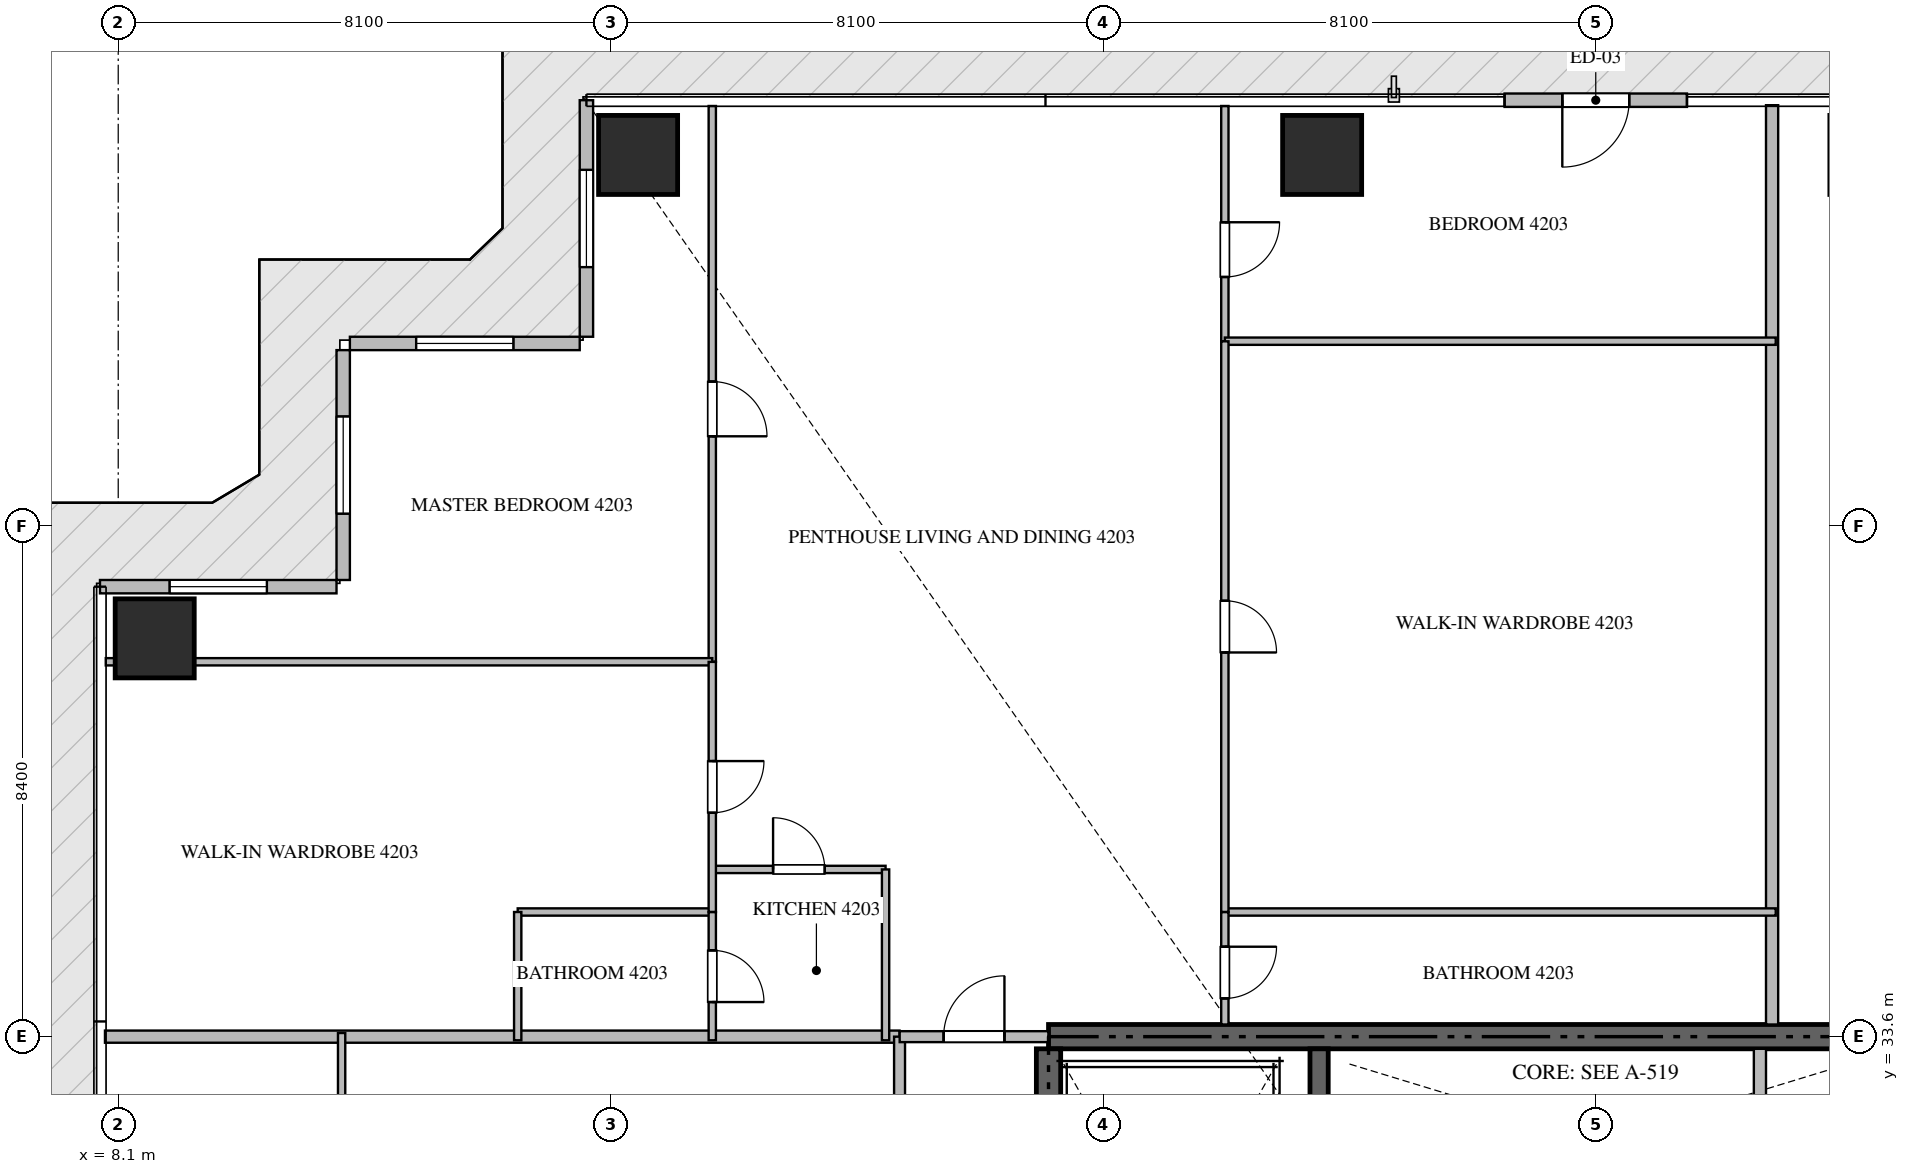
"""IFC4 building model, lengths in metres.
Left out: names, types, materials, properties, quantities, classifications, styles, units other than length and angle.
Written with IfcOpenShell. Run it as: python <this file> out.ifc"""

import sys

from ifc_helpers import new_model, si_unit, direction, frame, frame_2d, origin, origin_2d, place, context, subcontext, project, spatial, rectangle, extrude, source, transform, mapped, element, fill, save


model = new_model("IFC4")
c1 = context("Model", 3, precision=1e-05, world=origin(), true_north=direction((0.0, 1.0)))
c2 = subcontext(c1, "Body", "Model", "MODEL_VIEW")
j1 = project(units=[si_unit("LENGTHUNIT", "METRE"), si_unit("PLANEANGLEUNIT", "RADIAN")], contexts=[c1])
p1 = place(None, origin())
s1 = spatial("IfcSite", under=j1, at=p1, CompositionType="ELEMENT")
p2 = place(p1, origin())
s2 = spatial("IfcBuilding", under=s1, at=p2, CompositionType="ELEMENT")
p3 = place(p2, frame((0.0, 0.0, 168.9)))
s3 = spatial("IfcBuildingStorey", under=s2, at=p3, CompositionType="ELEMENT", Elevation=168.9)
p4 = place(p3, frame((41.4, 33.6, -0.26), z_axis=(0.0, 0.0, 1.0), x_axis=(-1.0, 0.0, 0.0)))
e1 = element("IfcWall", 1, at=p4, inside=s3, PredefinedType="SHEAR", context=c2, shape_type="SweptSolid", body=[
    extrude(rectangle(XDim=18.0, YDim=0.4, at=frame_2d((9.0, 0.0))), origin(), (0.0, 0.0, 1.0), 3.748),
])
p5 = place(p3, frame((23.4, 24.25, -0.26), z_axis=(0.0, 0.0, 1.0), x_axis=(0.0, 1.0, 0.0)))
e2 = element("IfcWall", 2, at=p5, inside=s3, PredefinedType="SHEAR", context=c2, shape_type="SweptSolid", body=[
    extrude(rectangle(XDim=9.15, YDim=0.4, at=frame_2d((4.575, 0.0))), origin(), (0.0, 0.0, 1.0), 3.748),
])
p6 = place(p3, frame((27.85, 23.55, -0.26), z_axis=(0.0, 0.0, 1.0), x_axis=(0.0, 1.0, 0.0)))
e3 = element("IfcWall", 3, at=p6, inside=s3, PredefinedType="SHEAR", context=c2, shape_type="SweptSolid", body=[
    extrude(rectangle(XDim=9.85, YDim=0.3, at=frame_2d((4.925, 0.0))), origin(), (0.0, 0.0, 1.0), 3.748),
])
m1 = source(origin(), c2, "Body", "SweptSolid", [
    extrude(rectangle(XDim=1.3, YDim=1.3, at=origin_2d()), origin(), (0.0, 0.0, 1.0), 3.75),
])
for number, where, z_axis, x_axis in (
    (4, (16.65, 48.1, -0.26), (0.0, 0.0, 1.0), (1.0, 0.0, 0.0)),
    (5, (27.9, 48.1, -0.26), (0.0, 0.0, 1.0), (1.0, 0.0, 0.0)),
    (6, (8.7, 40.15, -0.26), (0.0, 0.0, 1.0), (1.0, 0.0, 0.0)),
):
    element("IfcColumn", number, at=place(p3, frame(where, z_axis=z_axis, x_axis=x_axis)), inside=s3, PredefinedType="COLUMN", context=c2, shape_type="MappedRepresentation", body=[
        mapped(m1, transform((0.0, 0.0, 0.0), scale=1.0)),
    ])
p7 = place(p3, frame((33.9, 49.0, 0.0), z_axis=(0.0, 0.0, 1.0), x_axis=(-1.0, 0.0, 0.0)))
e7 = element("IfcWall", 7, at=p7, inside=s3, PredefinedType="ELEMENTEDWALL", context=c2, shape_type="SweptSolid", body=[
    extrude(rectangle(XDim=3.0, YDim=0.22, at=frame_2d((1.5, 0.0))), origin(), (0.0, 0.0, 1.0), 3.475),
])
p8 = place(p7, frame((0.95, 0.0, 0.0)))
e8 = element("IfcOpeningElement", 8, at=p8, cuts=e7, PredefinedType="OPENING", context=c2, shape_type="SweptSolid", body=[
    extrude(rectangle(XDim=1.1, YDim=2.2, at=frame_2d((0.55, 1.1))), frame((0.0, 0.12, 0.0), z_axis=(0.0, -1.0, 0.0), x_axis=(1.0, 0.0, 0.0)), (0.0, 0.0, 1.0), 0.24),
])
p9 = place(p3, frame((15.8, 49.0, 0.0), z_axis=(0.0, 0.0, 1.0), x_axis=(0.0, -1.0, 0.0)))
e9 = element("IfcWall", 9, at=p9, inside=s3, PredefinedType="ELEMENTEDWALL", context=c2, shape_type="SweptSolid", body=[
    extrude(rectangle(XDim=3.89, YDim=0.22, at=frame_2d((1.945, 0.0))), origin(), (0.0, 0.0, 1.0), 3.475),
])
p10 = place(p9, frame((1.145, 0.0, 0.65)))
e10 = element("IfcOpeningElement", 10, at=p10, cuts=e9, PredefinedType="OPENING", context=c2, shape_type="SweptSolid", body=[
    extrude(rectangle(XDim=1.6, YDim=2.1, at=frame_2d((0.8, 1.05))), frame((0.0, 0.12, 0.0), z_axis=(0.0, -1.0, 0.0), x_axis=(1.0, 0.0, 0.0)), (0.0, 0.0, 1.0), 0.24),
])
p11 = place(p3, frame((15.69, 45.0, 0.0), z_axis=(0.0, 0.0, 1.0), x_axis=(-1.0, 0.0, 0.0)))
e11 = element("IfcWall", 11, at=p11, inside=s3, PredefinedType="ELEMENTEDWALL", context=c2, shape_type="SweptSolid", body=[
    extrude(rectangle(XDim=3.78, YDim=0.22, at=frame_2d((1.89, 0.0))), origin(), (0.0, 0.0, 1.0), 3.475),
])
p12 = place(p11, frame((1.09, 0.0, 0.65)))
e12 = element("IfcOpeningElement", 12, at=p12, cuts=e11, PredefinedType="OPENING", context=c2, shape_type="SweptSolid", body=[
    extrude(rectangle(XDim=1.6, YDim=2.1, at=frame_2d((0.8, 1.05))), frame((0.0, 0.12, 0.0), z_axis=(0.0, -1.0, 0.0), x_axis=(1.0, 0.0, 0.0)), (0.0, 0.0, 1.0), 0.24),
])
p13 = place(p3, frame((11.8, 44.89, 0.0), z_axis=(0.0, 0.0, 1.0), x_axis=(0.0, -1.0, 0.0)))
e13 = element("IfcWall", 13, at=p13, inside=s3, PredefinedType="ELEMENTEDWALL", context=c2, shape_type="SweptSolid", body=[
    extrude(rectangle(XDim=3.78, YDim=0.22, at=frame_2d((1.89, 0.0))), origin(), (0.0, 0.0, 1.0), 3.475),
])
p14 = place(p13, frame((1.09, 0.0, 0.65)))
e14 = element("IfcOpeningElement", 14, at=p14, cuts=e13, PredefinedType="OPENING", context=c2, shape_type="SweptSolid", body=[
    extrude(rectangle(XDim=1.6, YDim=2.1, at=frame_2d((0.8, 1.05))), frame((0.0, 0.12, 0.0), z_axis=(0.0, -1.0, 0.0), x_axis=(1.0, 0.0, 0.0)), (0.0, 0.0, 1.0), 0.24),
])
p15 = place(p3, frame((11.69, 41.0, 0.0), z_axis=(0.0, 0.0, 1.0), x_axis=(-1.0, 0.0, 0.0)))
e15 = element("IfcWall", 15, at=p15, inside=s3, PredefinedType="ELEMENTEDWALL", context=c2, shape_type="SweptSolid", body=[
    extrude(rectangle(XDim=3.89, YDim=0.22, at=frame_2d((1.945, 0.0))), origin(), (0.0, 0.0, 1.0), 3.475),
])
p16 = place(p15, frame((1.145, 0.0, 0.65)))
e16 = element("IfcOpeningElement", 16, at=p16, cuts=e15, PredefinedType="OPENING", context=c2, shape_type="SweptSolid", body=[
    extrude(rectangle(XDim=1.6, YDim=2.1, at=frame_2d((0.8, 1.05))), frame((0.0, 0.12, 0.0), z_axis=(0.0, -1.0, 0.0), x_axis=(1.0, 0.0, 0.0)), (0.0, 0.0, 1.0), 0.24),
])
p17 = place(p3, frame((35.1, 30.75, 0.0), z_axis=(0.0, 0.0, 1.0), x_axis=(0.0, 1.0, 0.0)))
e17 = element("IfcWall", 17, at=p17, inside=s3, PredefinedType="STANDARD", context=c2, shape_type="SweptSolid", body=[
    extrude(rectangle(XDim=2.65, YDim=0.2, at=frame_2d((1.325, 0.0))), origin(), (0.0, 0.0, 1.0), 3.49),
])
p18 = place(p3, frame((35.3, 33.8, 0.0), z_axis=(0.0, 0.0, 1.0), x_axis=(0.0, 1.0, 0.0)))
e18 = element("IfcWall", 18, at=p18, inside=s3, PredefinedType="PARTITIONING", context=c2, shape_type="SweptSolid", body=[
    extrude(rectangle(XDim=15.118, YDim=0.2, at=frame_2d((7.559, 0.0))), origin(), (0.0, 0.0, 1.0), 3.49),
])
p19 = place(p3, frame((7.882, 33.6, 0.0), z_axis=(0.0, 0.0, 1.0), x_axis=(1.0, 0.0, 0.0)))
e19 = element("IfcWall", 19, at=p19, inside=s3, PredefinedType="PARTITIONING", context=c2, shape_type="SweptSolid", body=[
    extrude(rectangle(XDim=13.068, YDim=0.2, at=frame_2d((6.534, 0.0))), origin(), (0.0, 0.0, 1.0), 3.49),
])
p20 = place(p3, frame((20.95, 14.9, 0.0), z_axis=(0.0, 0.0, 1.0), x_axis=(0.0, 1.0, 0.0)))
e20 = element("IfcWall", 20, at=p20, inside=s3, PredefinedType="PARTITIONING", context=c2, shape_type="SweptSolid", body=[
    extrude(rectangle(XDim=18.7, YDim=0.18, at=frame_2d((9.35, 0.0))), origin(), (0.0, 0.0, 1.0), 3.49),
])
p21 = place(p20, frame((1.805, 0.0, 0.0)))
e21 = element("IfcOpeningElement", 21, at=p21, cuts=e20, PredefinedType="OPENING", context=c2, shape_type="SweptSolid", body=[
    extrude(rectangle(XDim=1.0, YDim=2.15, at=frame_2d((0.5, 1.075))), frame((0.0, 0.1, 0.0), z_axis=(0.0, -1.0, 0.0), x_axis=(1.0, 0.0, 0.0)), (0.0, 0.0, 1.0), 0.2),
])
p22 = place(p3, frame((20.952, 33.6, 0.0), z_axis=(0.0, 0.0, 1.0), x_axis=(1.0, 0.0, 0.0)))
e22 = element("IfcWall", 22, at=p22, inside=s3, PredefinedType="PARTITIONING", context=c2, shape_type="SweptSolid", body=[
    extrude(rectangle(XDim=2.446, YDim=0.18, at=frame_2d((1.223, 0.0))), origin(), (0.0, 0.0, 1.0), 3.49),
])
p23 = place(p22, frame((0.723, 0.0, 0.0)))
e23 = element("IfcOpeningElement", 23, at=p23, cuts=e22, PredefinedType="OPENING", context=c2, shape_type="SweptSolid", body=[
    extrude(rectangle(XDim=1.0, YDim=2.15, at=frame_2d((0.5, 1.075))), frame((0.0, 0.1, 0.0), z_axis=(0.0, -1.0, 0.0), x_axis=(1.0, 0.0, 0.0)), (0.0, 0.0, 1.0), 0.2),
])
p24 = place(p3, frame((17.87, 36.35, 0.0), z_axis=(0.0, 0.0, 1.0), x_axis=(1.0, 0.0, 0.0)))
e24 = element("IfcWall", 24, at=p24, inside=s3, PredefinedType="PARTITIONING", context=c2, shape_type="SweptSolid", body=[
    extrude(rectangle(XDim=2.85, YDim=0.12, at=frame_2d((1.425, 0.0))), origin(), (0.0, 0.0, 1.0), 3.49),
])
p25 = place(p24, frame((1.0, 0.0, 0.0)))
e25 = element("IfcOpeningElement", 25, at=p25, cuts=e24, PredefinedType="OPENING", context=c2, shape_type="SweptSolid", body=[
    extrude(rectangle(XDim=0.85, YDim=2.1, at=frame_2d((0.425, 1.05))), frame((0.0, 0.07, 0.0), z_axis=(0.0, -1.0, 0.0), x_axis=(1.0, 0.0, 0.0)), (0.0, 0.0, 1.0), 0.14),
])
p26 = place(p3, frame((20.72, 36.35, 0.0), z_axis=(0.0, 0.0, 1.0), x_axis=(0.0, -1.0, 0.0)))
e26 = element("IfcWall", 26, at=p26, inside=s3, PredefinedType="PARTITIONING", context=c2, shape_type="SweptSolid", body=[
    extrude(rectangle(XDim=2.81, YDim=0.12, at=frame_2d((1.405, 0.0))), origin(), (0.0, 0.0, 1.0), 3.49),
])
p27 = place(p3, frame((17.87, 48.905, 0.0), z_axis=(0.0, 0.0, 1.0), x_axis=(0.0, -1.0, 0.0)))
e27 = element("IfcWall", 27, at=p27, inside=s3, PredefinedType="PARTITIONING", context=c2, shape_type="SweptSolid", body=[
    extrude(rectangle(XDim=9.14, YDim=0.12, at=frame_2d((4.57, 0.0))), origin(), (0.0, 0.0, 1.0), 3.49),
])
p28 = place(p27, frame((4.532, 0.0, 0.0)))
e28 = element("IfcOpeningElement", 28, at=p28, cuts=e27, PredefinedType="OPENING", context=c2, shape_type="SweptSolid", body=[
    extrude(rectangle(XDim=0.9, YDim=2.1, at=frame_2d((0.45, 1.05))), frame((0.0, 0.07, 0.0), z_axis=(0.0, -1.0, 0.0), x_axis=(1.0, 0.0, 0.0)), (0.0, 0.0, 1.0), 0.14),
])
p29 = place(p3, frame((7.895, 39.765, 0.0), z_axis=(0.0, 0.0, 1.0), x_axis=(1.0, 0.0, 0.0)))
e29 = element("IfcWall", 29, at=p29, inside=s3, PredefinedType="PARTITIONING", context=c2, shape_type="SweptSolid", body=[
    extrude(rectangle(XDim=9.975, YDim=0.12, at=frame_2d((4.988, 0.0))), origin(), (0.0, 0.0, 1.0), 3.49),
])
p30 = place(p3, frame((14.67, 35.65, 0.0), z_axis=(0.0, 0.0, 1.0), x_axis=(1.0, 0.0, 0.0)))
e30 = element("IfcWall", 30, at=p30, inside=s3, PredefinedType="PARTITIONING", context=c2, shape_type="SweptSolid", body=[
    extrude(rectangle(XDim=3.2, YDim=0.12, at=frame_2d((1.6, 0.0))), origin(), (0.0, 0.0, 1.0), 3.49),
])
p31 = place(p3, frame((14.67, 35.65, 0.0), z_axis=(0.0, 0.0, 1.0), x_axis=(0.0, -1.0, 0.0)))
e31 = element("IfcWall", 31, at=p31, inside=s3, PredefinedType="PARTITIONING", context=c2, shape_type="SweptSolid", body=[
    extrude(rectangle(XDim=2.11, YDim=0.12, at=frame_2d((1.055, 0.0))), origin(), (0.0, 0.0, 1.0), 3.49),
])
p32 = place(p3, frame((17.87, 39.763, 0.0), z_axis=(0.0, 0.0, 1.0), x_axis=(0.0, -1.0, 0.0)))
e32 = element("IfcWall", 32, at=p32, inside=s3, PredefinedType="PARTITIONING", context=c2, shape_type="SweptSolid", body=[
    extrude(rectangle(XDim=4.113, YDim=0.12, at=frame_2d((2.057, 0.0))), origin(), (0.0, 0.0, 1.0), 3.49),
])
p33 = place(p32, frame((1.631, 0.0, 0.0)))
e33 = element("IfcOpeningElement", 33, at=p33, cuts=e32, PredefinedType="OPENING", context=c2, shape_type="SweptSolid", body=[
    extrude(rectangle(XDim=0.85, YDim=2.1, at=frame_2d((0.425, 1.05))), frame((0.0, 0.07, 0.0), z_axis=(0.0, -1.0, 0.0), x_axis=(1.0, 0.0, 0.0)), (0.0, 0.0, 1.0), 0.14),
])
p34 = place(p3, frame((17.87, 35.648, 0.0), z_axis=(0.0, 0.0, 1.0), x_axis=(0.0, -1.0, 0.0)))
e34 = element("IfcWall", 34, at=p34, inside=s3, PredefinedType="PARTITIONING", context=c2, shape_type="SweptSolid", body=[
    extrude(rectangle(XDim=2.108, YDim=0.12, at=frame_2d((1.054, 0.0))), origin(), (0.0, 0.0, 1.0), 3.49),
])
p35 = place(p34, frame((0.629, 0.0, 0.0)))
e35 = element("IfcOpeningElement", 35, at=p35, cuts=e34, PredefinedType="OPENING", context=c2, shape_type="SweptSolid", body=[
    extrude(rectangle(XDim=0.85, YDim=2.1, at=frame_2d((0.425, 1.05))), frame((0.0, 0.07, 0.0), z_axis=(0.0, -1.0, 0.0), x_axis=(1.0, 0.0, 0.0)), (0.0, 0.0, 1.0), 0.14),
])
p36 = place(p3, frame((26.3, 48.905, 0.0), z_axis=(0.0, 0.0, 1.0), x_axis=(0.0, -1.0, 0.0)))
e36 = element("IfcWall", 36, at=p36, inside=s3, PredefinedType="PARTITIONING", context=c2, shape_type="SweptSolid", body=[
    extrude(rectangle(XDim=3.868, YDim=0.12, at=frame_2d((1.934, 0.0))), origin(), (0.0, 0.0, 1.0), 3.49),
])
p37 = place(p36, frame((1.912, 0.0, 0.0)))
e37 = element("IfcOpeningElement", 37, at=p37, cuts=e36, PredefinedType="OPENING", context=c2, shape_type="SweptSolid", body=[
    extrude(rectangle(XDim=0.9, YDim=2.1, at=frame_2d((0.45, 1.05))), frame((0.0, 0.07, 0.0), z_axis=(0.0, -1.0, 0.0), x_axis=(1.0, 0.0, 0.0)), (0.0, 0.0, 1.0), 0.14),
])
for number, where, z_axis, x_axis in (
    (38, (26.3, 45.037, 0.0), (0.0, 0.0, 1.0), (1.0, 0.0, 0.0)),
    (39, (26.3, 35.65, 0.0), (0.0, 0.0, 1.0), (1.0, 0.0, 0.0)),
):
    element("IfcWall", number, at=place(p3, frame(where, z_axis=z_axis, x_axis=x_axis)), inside=s3, PredefinedType="PARTITIONING", context=c2, shape_type="SweptSolid", body=[
        extrude(rectangle(XDim=9.06, YDim=0.12, at=frame_2d((4.53, 0.0))), origin(), (0.0, 0.0, 1.0), 3.49),
    ])
p38 = place(p3, frame((26.3, 45.035, 0.0), z_axis=(0.0, 0.0, 1.0), x_axis=(0.0, -1.0, 0.0)))
e40 = element("IfcWall", 40, at=p38, inside=s3, PredefinedType="PARTITIONING", context=c2, shape_type="SweptSolid", body=[
    extrude(rectangle(XDim=9.385, YDim=0.12, at=frame_2d((4.692, 0.0))), origin(), (0.0, 0.0, 1.0), 3.49),
])
p39 = place(p38, frame((4.267, 0.0, 0.0)))
e41 = element("IfcOpeningElement", 41, at=p39, cuts=e40, PredefinedType="OPENING", context=c2, shape_type="SweptSolid", body=[
    extrude(rectangle(XDim=0.85, YDim=2.1, at=frame_2d((0.425, 1.05))), frame((0.0, 0.07, 0.0), z_axis=(0.0, -1.0, 0.0), x_axis=(1.0, 0.0, 0.0)), (0.0, 0.0, 1.0), 0.14),
])
p40 = place(p3, frame((26.3, 35.648, 0.0), z_axis=(0.0, 0.0, 1.0), x_axis=(0.0, -1.0, 0.0)))
e42 = element("IfcWall", 42, at=p40, inside=s3, PredefinedType="PARTITIONING", context=c2, shape_type="SweptSolid", body=[
    extrude(rectangle(XDim=1.848, YDim=0.12, at=frame_2d((0.924, 0.0))), origin(), (0.0, 0.0, 1.0), 3.49),
])
p41 = place(p40, frame((0.569, 0.0, 0.0)))
e43 = element("IfcOpeningElement", 43, at=p41, cuts=e42, PredefinedType="OPENING", context=c2, shape_type="SweptSolid", body=[
    extrude(rectangle(XDim=0.85, YDim=2.1, at=frame_2d((0.425, 1.05))), frame((0.0, 0.07, 0.0), z_axis=(0.0, -1.0, 0.0), x_axis=(1.0, 0.0, 0.0)), (0.0, 0.0, 1.0), 0.14),
])
p42 = place(p3, frame((11.774, 22.6, 0.0), z_axis=(0.0, 0.0, 1.0), x_axis=(0.0, 1.0, 0.0)))
e44 = element("IfcWall", 44, at=p42, inside=s3, PredefinedType="PARTITIONING", context=c2, shape_type="SweptSolid", body=[
    extrude(rectangle(XDim=11.06, YDim=0.12, at=frame_2d((5.53, 0.0))), origin(), (0.0, 0.0, 1.0), 3.49),
])
m2 = source(origin(), c2, "Body", "SweptSolid", [
    extrude(rectangle(XDim=1.1, YDim=2.2, at=frame_2d((0.55, 1.1))), frame((0.0, 0.025, 0.0), z_axis=(0.0, -1.0, 0.0), x_axis=(1.0, 0.0, 0.0)), (0.0, 0.0, 1.0), 0.05),
])
p43 = place(p8, origin())
e45 = element("IfcDoor", 45, at=p43, inside=s3, OperationType="SINGLE_SWING_RIGHT", PredefinedType="DOOR", context=c2, shape_type="MappedRepresentation", body=[
    mapped(m2, transform((0.0, 0.0, 0.0), scale=1.0)),
])
fill(e8, e45)
m3 = source(origin(), c2, "Body", "SweptSolid", [
    extrude(rectangle(XDim=1.6, YDim=2.1, at=frame_2d((0.8, 1.05))), frame((0.0, 0.03, 0.0), z_axis=(0.0, -1.0, 0.0), x_axis=(1.0, 0.0, 0.0)), (0.0, 0.0, 1.0), 0.06),
])
p44 = place(p10, origin())
e46 = element("IfcWindow", 46, at=p44, inside=s3, PartitioningType="SINGLE_PANEL", PredefinedType="WINDOW", context=c2, shape_type="MappedRepresentation", body=[
    mapped(m3, transform((0.0, 0.0, 0.0), scale=1.0)),
])
fill(e10, e46)
p45 = place(p12, origin())
e47 = element("IfcWindow", 47, at=p45, inside=s3, PartitioningType="SINGLE_PANEL", PredefinedType="WINDOW", context=c2, shape_type="MappedRepresentation", body=[
    mapped(m3, transform((0.0, 0.0, 0.0), scale=1.0)),
])
fill(e12, e47)
p46 = place(p14, origin())
e48 = element("IfcWindow", 48, at=p46, inside=s3, PartitioningType="SINGLE_PANEL", PredefinedType="WINDOW", context=c2, shape_type="MappedRepresentation", body=[
    mapped(m3, transform((0.0, 0.0, 0.0), scale=1.0)),
])
fill(e14, e48)
p47 = place(p16, origin())
e49 = element("IfcWindow", 49, at=p47, inside=s3, PartitioningType="SINGLE_PANEL", PredefinedType="WINDOW", context=c2, shape_type="MappedRepresentation", body=[
    mapped(m3, transform((0.0, 0.0, 0.0), scale=1.0)),
])
fill(e16, e49)
m4 = source(origin(), c2, "Body", "SweptSolid", [
    extrude(rectangle(XDim=1.0, YDim=2.15, at=frame_2d((0.5, 1.075))), frame((0.0, 0.025, 0.0), z_axis=(0.0, -1.0, 0.0), x_axis=(1.0, 0.0, 0.0)), (0.0, 0.0, 1.0), 0.05),
])
p48 = place(p23, origin())
e50 = element("IfcDoor", 50, at=p48, inside=s3, OperationType="SINGLE_SWING_RIGHT", PredefinedType="DOOR", context=c2, shape_type="MappedRepresentation", body=[
    mapped(m4, transform((0.0, 0.0, 0.0), scale=1.0)),
])
fill(e23, e50)
m5 = source(origin(), c2, "Body", "SweptSolid", [
    extrude(rectangle(XDim=0.85, YDim=2.1, at=frame_2d((0.425, 1.05))), frame((0.0, 0.025, 0.0), z_axis=(0.0, -1.0, 0.0), x_axis=(1.0, 0.0, 0.0)), (0.0, 0.0, 1.0), 0.05),
])
p49 = place(p25, origin())
e51 = element("IfcDoor", 51, at=p49, inside=s3, OperationType="SINGLE_SWING_LEFT", PredefinedType="DOOR", context=c2, shape_type="MappedRepresentation", body=[
    mapped(m5, transform((0.0, 0.0, 0.0), scale=1.0)),
])
fill(e25, e51)
m6 = source(origin(), c2, "Body", "SweptSolid", [
    extrude(rectangle(XDim=0.9, YDim=2.1, at=frame_2d((0.45, 1.05))), frame((0.0, 0.025, 0.0), z_axis=(0.0, -1.0, 0.0), x_axis=(1.0, 0.0, 0.0)), (0.0, 0.0, 1.0), 0.05),
])
p50 = place(p28, origin())
e52 = element("IfcDoor", 52, at=p50, inside=s3, OperationType="SINGLE_SWING_RIGHT", PredefinedType="DOOR", context=c2, shape_type="MappedRepresentation", body=[
    mapped(m6, transform((0.0, 0.0, 0.0), scale=1.0)),
])
fill(e28, e52)
p51 = place(p33, origin())
e53 = element("IfcDoor", 53, at=p51, inside=s3, OperationType="SINGLE_SWING_LEFT", PredefinedType="DOOR", context=c2, shape_type="MappedRepresentation", body=[
    mapped(m5, transform((0.0, 0.0, 0.0), scale=1.0)),
])
fill(e33, e53)
p52 = place(p35, origin())
e54 = element("IfcDoor", 54, at=p52, inside=s3, OperationType="SINGLE_SWING_RIGHT", PredefinedType="DOOR", context=c2, shape_type="MappedRepresentation", body=[
    mapped(m5, transform((0.0, 0.0, 0.0), scale=1.0)),
])
fill(e35, e54)
p53 = place(p37, origin())
e55 = element("IfcDoor", 55, at=p53, inside=s3, OperationType="SINGLE_SWING_LEFT", PredefinedType="DOOR", context=c2, shape_type="MappedRepresentation", body=[
    mapped(m6, transform((0.0, 0.0, 0.0), scale=1.0)),
])
fill(e37, e55)
p54 = place(p39, origin())
e56 = element("IfcDoor", 56, at=p54, inside=s3, OperationType="SINGLE_SWING_RIGHT", PredefinedType="DOOR", context=c2, shape_type="MappedRepresentation", body=[
    mapped(m5, transform((0.0, 0.0, 0.0), scale=1.0)),
])
fill(e41, e56)
p55 = place(p41, origin())
e57 = element("IfcDoor", 57, at=p55, inside=s3, OperationType="SINGLE_SWING_LEFT", PredefinedType="DOOR", context=c2, shape_type="MappedRepresentation", body=[
    mapped(m5, transform((0.0, 0.0, 0.0), scale=1.0)),
])
fill(e43, e57)
save(model, sys.argv[1])
